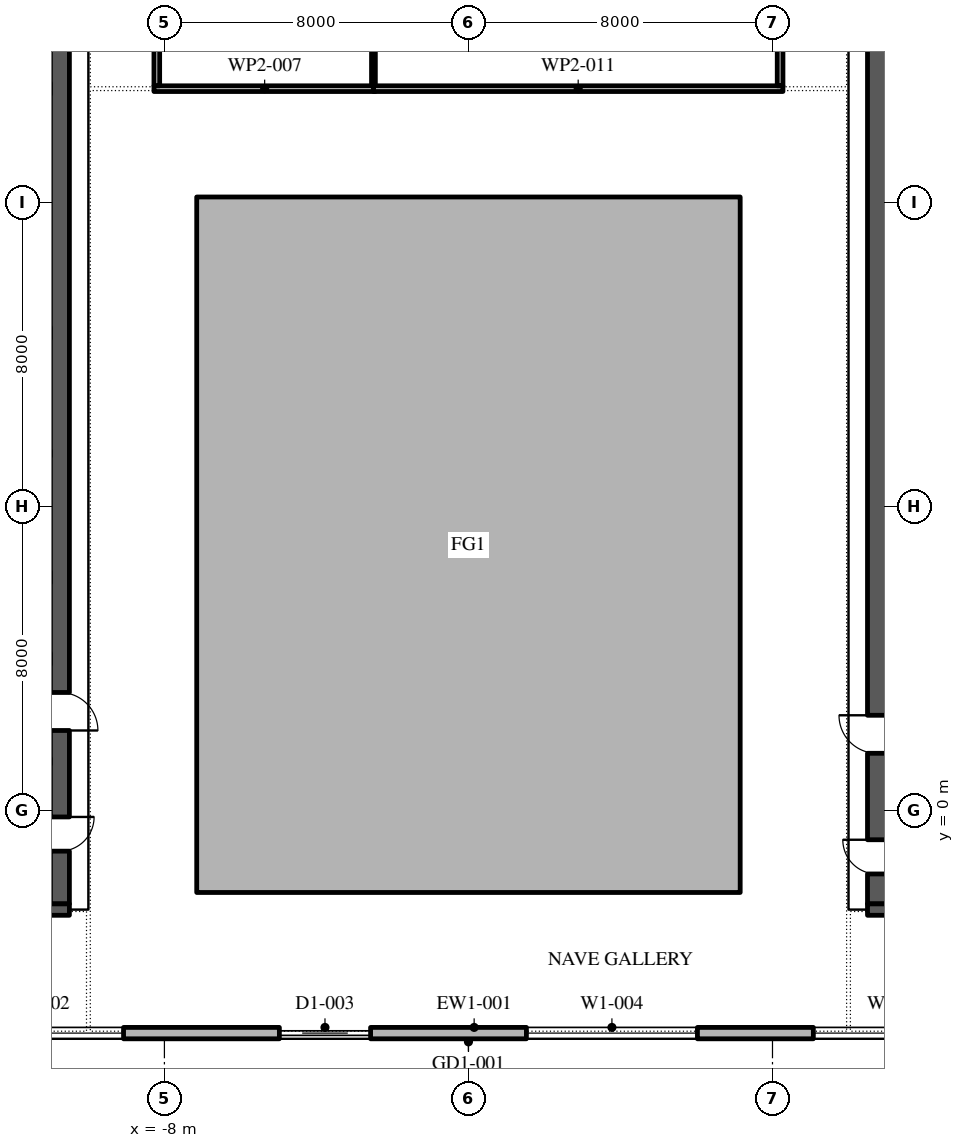
"""IFC4 building model, lengths in metres.
Left out: names, types, materials, properties, quantities, classifications, styles, units other than length and angle.
Written with IfcOpenShell. Run it as: python <this file> out.ifc"""

import sys

from ifc_helpers import new_model, si_unit, direction, frame, frame_2d, origin, place, context, subcontext, project, spatial, polyline, rectangle, outline, extrude, element, fill, save


model = new_model("IFC4")
c1 = context("Model", 3, precision=1e-05, world=origin(), true_north=direction((0.0, 1.0)))
c2 = subcontext(c1, "Body", "Model", "MODEL_VIEW")
j1 = project(units=[si_unit("LENGTHUNIT", "METRE"), si_unit("PLANEANGLEUNIT", "RADIAN")], contexts=[c1])
p1 = place(None, origin())
s1 = spatial("IfcSite", under=j1, at=p1, CompositionType="ELEMENT")
p2 = place(p1, origin())
s2 = spatial("IfcBuilding", under=s1, at=p2, CompositionType="ELEMENT")
p3 = place(p2, frame((0.0, 0.0, 325.8)))
s3 = spatial("IfcBuildingStorey", under=s2, at=p3, CompositionType="ELEMENT", Elevation=325.8)
p4 = place(p3, origin())
e1 = element("IfcWall", 1, at=p4, inside=s3, PredefinedType="STANDARD", context=c2, shape_type="SweptSolid", body=[
    extrude(outline(polyline([(-7.15, -2.15), (7.15, -2.15), (7.15, 16.15), (-7.15, 16.15), (-7.15, -2.15)]), holes=[polyline([(-7.0, -2.0), (-7.0, 16.0), (7.0, 16.0), (7.0, -2.0), (-7.0, -2.0)])]), origin(), (0.0, 0.0, 1.0), 4.0),
])
p5 = place(p3, frame((-22.35, -5.85, 0.0), z_axis=(0.0, 0.0, 1.0), x_axis=(1.0, 0.0, 0.0)))
e2 = element("IfcWall", 2, at=p5, inside=s3, PredefinedType="STANDARD", context=c2, shape_type="SweptSolid", body=[
    extrude(rectangle(XDim=45.0, YDim=0.3, at=frame_2d((22.5, 0.0))), origin(), (0.0, 0.0, 1.0), 4.0),
])
p6 = place(p5, frame((1.375, 0.0, 0.45)))
e3 = element("IfcOpeningElement", 3, at=p6, cuts=e2, PredefinedType="OPENING", context=c2, shape_type="SweptSolid", body=[
    extrude(rectangle(XDim=4.5, YDim=3.05, at=frame_2d((2.25, 1.525))), frame((0.0, 0.16, 0.0), z_axis=(0.0, -1.0, 0.0), x_axis=(1.0, 0.0, 0.0)), (0.0, 0.0, 1.0), 0.32),
])
p7 = place(p5, frame((8.775, 0.0, 0.45)))
e4 = element("IfcOpeningElement", 4, at=p7, cuts=e2, PredefinedType="OPENING", context=c2, shape_type="SweptSolid", body=[
    extrude(rectangle(XDim=4.5, YDim=3.05, at=frame_2d((2.25, 1.525))), frame((0.0, 0.16, 0.0), z_axis=(0.0, -1.0, 0.0), x_axis=(1.0, 0.0, 0.0)), (0.0, 0.0, 1.0), 0.32),
])
p8 = place(p5, frame((17.375, 0.0, 0.0)))
e5 = element("IfcOpeningElement", 5, at=p8, cuts=e2, PredefinedType="OPENING", context=c2, shape_type="SweptSolid", body=[
    extrude(rectangle(XDim=2.4, YDim=3.5, at=frame_2d((1.2, 1.75))), frame((0.0, 0.16, 0.0), z_axis=(0.0, -1.0, 0.0), x_axis=(1.0, 0.0, 0.0)), (0.0, 0.0, 1.0), 0.32),
])
p9 = place(p5, frame((23.875, 0.0, 0.45)))
e6 = element("IfcOpeningElement", 6, at=p9, cuts=e2, PredefinedType="OPENING", context=c2, shape_type="SweptSolid", body=[
    extrude(rectangle(XDim=4.5, YDim=3.05, at=frame_2d((2.25, 1.525))), frame((0.0, 0.16, 0.0), z_axis=(0.0, -1.0, 0.0), x_axis=(1.0, 0.0, 0.0)), (0.0, 0.0, 1.0), 0.32),
])
p10 = place(p5, frame((31.425, 0.0, 0.45)))
e7 = element("IfcOpeningElement", 7, at=p10, cuts=e2, PredefinedType="OPENING", context=c2, shape_type="SweptSolid", body=[
    extrude(rectangle(XDim=4.5, YDim=3.05, at=frame_2d((2.25, 1.525))), frame((0.0, 0.16, 0.0), z_axis=(0.0, -1.0, 0.0), x_axis=(1.0, 0.0, 0.0)), (0.0, 0.0, 1.0), 0.32),
])
p11 = place(p5, frame((38.975, 0.0, 0.45)))
e8 = element("IfcOpeningElement", 8, at=p11, cuts=e2, PredefinedType="OPENING", context=c2, shape_type="SweptSolid", body=[
    extrude(rectangle(XDim=4.5, YDim=3.05, at=frame_2d((2.25, 1.525))), frame((0.0, 0.16, 0.0), z_axis=(0.0, -1.0, 0.0), x_axis=(1.0, 0.0, 0.0)), (0.0, 0.0, 1.0), 0.32),
])
p12 = place(p3, frame((-10.75, -2.45, 0.0), z_axis=(0.0, 0.0, 1.0), x_axis=(0.0, 1.0, 0.0)))
e9 = element("IfcWall", 9, at=p12, inside=s3, PredefinedType="SHEAR", context=c2, shape_type="SweptSolid", body=[
    extrude(rectangle(XDim=27.9, YDim=0.5, at=frame_2d((13.95, 0.0))), origin(), (0.0, 0.0, 1.0), 4.0),
])
p13 = place(p12, frame((23.65, 0.0, 0.0)))
e10 = element("IfcOpeningElement", 10, at=p13, cuts=e9, PredefinedType="OPENING", context=c2, shape_type="SweptSolid", body=[
    extrude(rectangle(XDim=2.4, YDim=2.1, at=frame_2d((1.2, 1.05))), frame((0.0, 0.26, 0.0), z_axis=(0.0, -1.0, 0.0), x_axis=(1.0, 0.0, 0.0)), (0.0, 0.0, 1.0), 0.52),
])
p14 = place(p12, frame((1.387, 0.0, 0.0)))
e11 = element("IfcOpeningElement", 11, at=p14, cuts=e9, PredefinedType="OPENING", context=c2, shape_type="SweptSolid", body=[
    extrude(rectangle(XDim=0.9, YDim=2.1, at=frame_2d((0.45, 1.05))), frame((0.0, 0.26, 0.0), z_axis=(0.0, -1.0, 0.0), x_axis=(1.0, 0.0, 0.0)), (0.0, 0.0, 1.0), 0.52),
])
p15 = place(p12, frame((4.562, 0.0, 0.0)))
e12 = element("IfcOpeningElement", 12, at=p15, cuts=e9, PredefinedType="OPENING", context=c2, shape_type="SweptSolid", body=[
    extrude(rectangle(XDim=1.0, YDim=2.1, at=frame_2d((0.5, 1.05))), frame((0.0, 0.26, 0.0), z_axis=(0.0, -1.0, 0.0), x_axis=(1.0, 0.0, 0.0)), (0.0, 0.0, 1.0), 0.52),
])
p16 = place(p3, frame((-21.5, -2.6, 0.0), z_axis=(0.0, 0.0, 1.0), x_axis=(1.0, 0.0, 0.0)))
e13 = element("IfcWall", 13, at=p16, inside=s3, PredefinedType="SHEAR", context=c2, shape_type="SweptSolid", body=[
    extrude(rectangle(XDim=11.0, YDim=0.3, at=frame_2d((5.5, 0.0))), origin(), (0.0, 0.0, 1.0), 4.0),
])
p17 = place(p3, frame((10.75, -2.45, 0.0), z_axis=(0.0, 0.0, 1.0), x_axis=(0.0, 1.0, 0.0)))
e14 = element("IfcWall", 14, at=p17, inside=s3, PredefinedType="SHEAR", context=c2, shape_type="SweptSolid", body=[
    extrude(rectangle(XDim=27.9, YDim=0.5, at=frame_2d((13.95, 0.0))), origin(), (0.0, 0.0, 1.0), 4.0),
])
p18 = place(p17, frame((23.65, 0.0, 0.0)))
e15 = element("IfcOpeningElement", 15, at=p18, cuts=e14, PredefinedType="OPENING", context=c2, shape_type="SweptSolid", body=[
    extrude(rectangle(XDim=2.4, YDim=2.1, at=frame_2d((1.2, 1.05))), frame((0.0, 0.26, 0.0), z_axis=(0.0, -1.0, 0.0), x_axis=(1.0, 0.0, 0.0)), (0.0, 0.0, 1.0), 0.52),
])
p19 = place(p17, frame((0.788, 0.0, 0.0)))
e16 = element("IfcOpeningElement", 16, at=p19, cuts=e14, PredefinedType="OPENING", context=c2, shape_type="SweptSolid", body=[
    extrude(rectangle(XDim=0.9, YDim=2.1, at=frame_2d((0.45, 1.05))), frame((0.0, 0.26, 0.0), z_axis=(0.0, -1.0, 0.0), x_axis=(1.0, 0.0, 0.0)), (0.0, 0.0, 1.0), 0.52),
])
p20 = place(p17, frame((3.962, 0.0, 0.0)))
e17 = element("IfcOpeningElement", 17, at=p20, cuts=e14, PredefinedType="OPENING", context=c2, shape_type="SweptSolid", body=[
    extrude(rectangle(XDim=1.0, YDim=2.1, at=frame_2d((0.5, 1.05))), frame((0.0, 0.26, 0.0), z_axis=(0.0, -1.0, 0.0), x_axis=(1.0, 0.0, 0.0)), (0.0, 0.0, 1.0), 0.52),
])
p21 = place(p3, frame((10.5, -2.6, 0.0), z_axis=(0.0, 0.0, 1.0), x_axis=(1.0, 0.0, 0.0)))
e18 = element("IfcWall", 18, at=p21, inside=s3, PredefinedType="SHEAR", context=c2, shape_type="SweptSolid", body=[
    extrude(rectangle(XDim=11.0, YDim=0.3, at=frame_2d((5.5, 0.0))), origin(), (0.0, 0.0, 1.0), 4.0),
])
p22 = place(p3, frame((-8.275, 19.0, 0.0), z_axis=(0.0, 0.0, 1.0), x_axis=(1.0, 0.0, 0.0)))
e19 = element("IfcWall", 19, at=p22, inside=s3, PredefinedType="PARTITIONING", context=c2, shape_type="SweptSolid", body=[
    extrude(rectangle(XDim=5.825, YDim=0.15, at=frame_2d((2.913, 0.0))), origin(), (0.0, 0.0, 1.0), 4.0),
])
p23 = place(p3, frame((-8.2, 41.075, 0.0), z_axis=(0.0, 0.0, 1.0), x_axis=(0.0, -1.0, 0.0)))
e20 = element("IfcWall", 20, at=p23, inside=s3, PredefinedType="PARTITIONING", context=c2, shape_type="SweptSolid", body=[
    extrude(rectangle(XDim=22.0, YDim=0.15, at=frame_2d((11.0, 0.0))), origin(), (0.0, 0.0, 1.0), 4.0),
])
p24 = place(p23, frame((10.675, 0.0, 0.0)))
e21 = element("IfcOpeningElement", 21, at=p24, cuts=e20, PredefinedType="OPENING", context=c2, shape_type="SweptSolid", body=[
    extrude(rectangle(XDim=1.0, YDim=2.1, at=frame_2d((0.5, 1.05))), frame((0.0, 0.085, 0.0), z_axis=(0.0, -1.0, 0.0), x_axis=(1.0, 0.0, 0.0)), (0.0, 0.0, 1.0), 0.17),
])
p25 = place(p3, frame((-2.5, 19.075, 0.0), z_axis=(0.0, 0.0, 1.0), x_axis=(0.0, 1.0, 0.0)))
e22 = element("IfcWall", 22, at=p25, inside=s3, PredefinedType="PARTITIONING", context=c2, shape_type="SweptSolid", body=[
    extrude(rectangle(XDim=22.0, YDim=0.1, at=frame_2d((11.0, 0.0))), origin(), (0.0, 0.0, 1.0), 4.0),
])
p26 = place(p3, frame((-2.5, 19.0, 0.0), z_axis=(0.0, 0.0, 1.0), x_axis=(1.0, 0.0, 0.0)))
e23 = element("IfcWall", 23, at=p26, inside=s3, PredefinedType="PARTITIONING", context=c2, shape_type="SweptSolid", body=[
    extrude(rectangle(XDim=10.775, YDim=0.15, at=frame_2d((5.387, 0.0))), origin(), (0.0, 0.0, 1.0), 4.0),
])
p27 = place(p3, frame((8.2, 19.075, 0.0), z_axis=(0.0, 0.0, 1.0), x_axis=(0.0, 1.0, 0.0)))
e24 = element("IfcWall", 24, at=p27, inside=s3, PredefinedType="PARTITIONING", context=c2, shape_type="SweptSolid", body=[
    extrude(rectangle(XDim=22.0, YDim=0.15, at=frame_2d((11.0, 0.0))), origin(), (0.0, 0.0, 1.0), 4.0),
])
p28 = place(p27, frame((7.725, 0.0, 0.0)))
e25 = element("IfcOpeningElement", 25, at=p28, cuts=e24, PredefinedType="OPENING", context=c2, shape_type="SweptSolid", body=[
    extrude(rectangle(XDim=1.8, YDim=2.1, at=frame_2d((0.9, 1.05))), frame((0.0, 0.085, 0.0), z_axis=(0.0, -1.0, 0.0), x_axis=(1.0, 0.0, 0.0)), (0.0, 0.0, 1.0), 0.17),
])
p29 = place(p7, origin())
e26 = element("IfcWindow", 26, at=p29, inside=s3, PartitioningType="DOUBLE_PANEL_VERTICAL", PredefinedType="WINDOW", context=c2, shape_type="SweptSolid", body=[
    extrude(rectangle(XDim=4.5, YDim=3.05, at=frame_2d((2.25, 1.525))), frame((0.0, 0.03, 0.0), z_axis=(0.0, -1.0, 0.0), x_axis=(1.0, 0.0, 0.0)), (0.0, 0.0, 1.0), 0.06),
])
fill(e4, e26)
p30 = place(p8, origin())
e27 = element("IfcDoor", 27, at=p30, inside=s3, OperationType="DOUBLE_DOOR_SLIDING", PredefinedType="DOOR", context=c2, shape_type="SweptSolid", body=[
    extrude(rectangle(XDim=2.4, YDim=3.5, at=frame_2d((1.2, 1.75))), frame((0.0, 0.025, 0.0), z_axis=(0.0, -1.0, 0.0), x_axis=(1.0, 0.0, 0.0)), (0.0, 0.0, 1.0), 0.05),
])
fill(e5, e27)
p31 = place(p9, origin())
e28 = element("IfcWindow", 28, at=p31, inside=s3, PartitioningType="DOUBLE_PANEL_VERTICAL", PredefinedType="WINDOW", context=c2, shape_type="SweptSolid", body=[
    extrude(rectangle(XDim=4.5, YDim=3.05, at=frame_2d((2.25, 1.525))), frame((0.0, 0.03, 0.0), z_axis=(0.0, -1.0, 0.0), x_axis=(1.0, 0.0, 0.0)), (0.0, 0.0, 1.0), 0.06),
])
fill(e6, e28)
p32 = place(p10, origin())
e29 = element("IfcWindow", 29, at=p32, inside=s3, PartitioningType="DOUBLE_PANEL_VERTICAL", PredefinedType="WINDOW", context=c2, shape_type="SweptSolid", body=[
    extrude(rectangle(XDim=4.5, YDim=3.05, at=frame_2d((2.25, 1.525))), frame((0.0, 0.03, 0.0), z_axis=(0.0, -1.0, 0.0), x_axis=(1.0, 0.0, 0.0)), (0.0, 0.0, 1.0), 0.06),
])
fill(e7, e29)
save(model, sys.argv[1])
